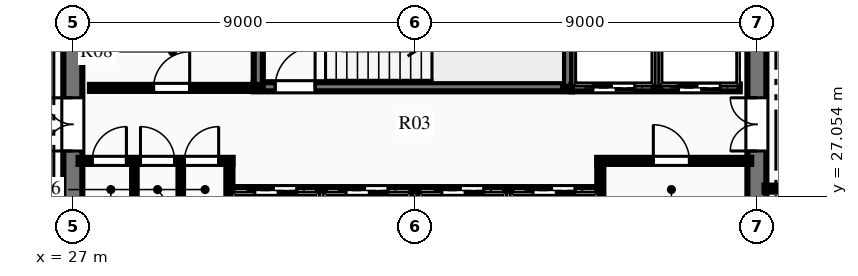
"""IFC4 building model, lengths in metres.
Left out: names, types, materials, properties, quantities, classifications, styles, units other than length and angle.
Written with IfcOpenShell. Run it as: python <this file> out.ifc"""

import sys

from ifc_helpers import new_model, si_unit, direction, frame, frame_2d, origin, place, context, subcontext, project, spatial, rectangle, extrude, element, fill, save


model = new_model("IFC4")
c1 = context("Model", 3, precision=1e-05, world=origin(), true_north=direction((0.0, 1.0)))
c2 = subcontext(c1, "Body", "Model", "MODEL_VIEW")
j1 = project(units=[si_unit("LENGTHUNIT", "METRE"), si_unit("PLANEANGLEUNIT", "RADIAN")], contexts=[c1])
p1 = place(None, origin())
s1 = spatial("IfcSite", under=j1, at=p1, CompositionType="ELEMENT")
p2 = place(p1, origin())
s2 = spatial("IfcBuilding", under=s1, at=p2, CompositionType="ELEMENT")
p3 = place(p2, frame((0.0, 0.0, 213.45)))
s3 = spatial("IfcBuildingStorey", under=s2, at=p3, CompositionType="ELEMENT", Elevation=213.45)
p4 = place(p3, frame((27.0, 18.25, 0.0), z_axis=(0.0, 0.0, 1.0), x_axis=(0.0, 1.0, 0.0)))
e1 = element("IfcWall", 1, at=p4, inside=s3, PredefinedType="SHEAR", context=c2, shape_type="SweptSolid", body=[
    extrude(rectangle(XDim=15.5, YDim=0.5, at=frame_2d((7.75, 0.0))), origin(), (0.0, 0.0, 1.0), 3.75),
])
p5 = place(p4, frame((9.99, 0.0, 0.0)))
e2 = element("IfcOpeningElement", 2, at=p5, cuts=e1, PredefinedType="OPENING", context=c2, shape_type="SweptSolid", body=[
    extrude(rectangle(XDim=1.4, YDim=2.2, at=frame_2d((0.7, 1.1))), frame((0.0, 0.26, 0.0), z_axis=(0.0, -1.0, 0.0), x_axis=(1.0, 0.0, 0.0)), (0.0, 0.0, 1.0), 0.52),
])
p6 = place(p3, frame((45.0, 18.25, 0.0), z_axis=(0.0, 0.0, 1.0), x_axis=(0.0, 1.0, 0.0)))
e3 = element("IfcWall", 3, at=p6, inside=s3, PredefinedType="SHEAR", context=c2, shape_type="SweptSolid", body=[
    extrude(rectangle(XDim=15.5, YDim=0.5, at=frame_2d((7.75, 0.0))), origin(), (0.0, 0.0, 1.0), 3.75),
])
p7 = place(p6, frame((9.99, 0.0, 0.0)))
e4 = element("IfcOpeningElement", 4, at=p7, cuts=e3, PredefinedType="OPENING", context=c2, shape_type="SweptSolid", body=[
    extrude(rectangle(XDim=1.4, YDim=2.2, at=frame_2d((0.7, 1.1))), frame((0.0, 0.26, 0.0), z_axis=(0.0, -1.0, 0.0), x_axis=(1.0, 0.0, 0.0)), (0.0, 0.0, 1.0), 0.52),
])
p8 = place(p3, frame((31.76, 29.93, 0.0), z_axis=(0.0, 0.0, 1.0), x_axis=(1.0, 0.0, 0.0)))
e5 = element("IfcWall", 5, at=p8, inside=s3, PredefinedType="SHEAR", context=c2, shape_type="SweptSolid", body=[
    extrude(rectangle(XDim=8.38, YDim=0.24, at=frame_2d((4.19, 0.0))), origin(), (0.0, 0.0, 1.0), 3.75),
])
p9 = place(p8, frame((0.565, 0.0, 0.0)))
e6 = element("IfcOpeningElement", 6, at=p9, cuts=e5, PredefinedType="OPENING", context=c2, shape_type="SweptSolid", body=[
    extrude(rectangle(XDim=1.05, YDim=2.15, at=frame_2d((0.525, 1.075))), frame((0.0, 0.13, 0.0), z_axis=(0.0, -1.0, 0.0), x_axis=(1.0, 0.0, 0.0)), (0.0, 0.0, 1.0), 0.26),
])
p10 = place(p3, frame((31.88, 29.93, 0.0), z_axis=(0.0, 0.0, 1.0), x_axis=(0.0, 1.0, 0.0)))
e7 = element("IfcWall", 7, at=p10, inside=s3, PredefinedType="SHEAR", context=c2, shape_type="SweptSolid", body=[
    extrude(rectangle(XDim=3.79, YDim=0.24, at=frame_2d((1.895, 0.0))), origin(), (0.0, 0.0, 1.0), 3.75),
])
p11 = place(p3, frame((40.02, 29.93, 0.0), z_axis=(0.0, 0.0, 1.0), x_axis=(0.0, 1.0, 0.0)))
e8 = element("IfcWall", 8, at=p11, inside=s3, PredefinedType="SHEAR", context=c2, shape_type="SweptSolid", body=[
    extrude(rectangle(XDim=3.85, YDim=0.24, at=frame_2d((1.925, 0.0))), origin(), (0.0, 0.0, 1.0), 3.75),
])
p12 = place(p3, frame((27.15, 27.98, 0.0), z_axis=(0.0, 0.0, 1.0), x_axis=(1.0, 0.0, 0.0)))
e9 = element("IfcWall", 9, at=p12, inside=s3, PredefinedType="PARTITIONING", context=c2, shape_type="SweptSolid", body=[
    extrude(rectangle(XDim=4.05, YDim=0.16, at=frame_2d((2.025, 0.0))), origin(), (0.0, 0.0, 1.0), 3.47),
])
p13 = place(p12, frame((0.36, 0.0, 0.0)))
e10 = element("IfcOpeningElement", 10, at=p13, cuts=e9, PredefinedType="OPENING", context=c2, shape_type="SweptSolid", body=[
    extrude(rectangle(XDim=0.9, YDim=2.15, at=frame_2d((0.45, 1.075))), frame((0.0, 0.09, 0.0), z_axis=(0.0, -1.0, 0.0), x_axis=(1.0, 0.0, 0.0)), (0.0, 0.0, 1.0), 0.18),
])
p14 = place(p12, frame((1.63, 0.0, 0.0)))
e11 = element("IfcOpeningElement", 11, at=p14, cuts=e9, PredefinedType="OPENING", context=c2, shape_type="SweptSolid", body=[
    extrude(rectangle(XDim=0.9, YDim=2.15, at=frame_2d((0.45, 1.075))), frame((0.0, 0.09, 0.0), z_axis=(0.0, -1.0, 0.0), x_axis=(1.0, 0.0, 0.0)), (0.0, 0.0, 1.0), 0.18),
])
p15 = place(p12, frame((2.788, 0.0, 0.0)))
e12 = element("IfcOpeningElement", 12, at=p15, cuts=e9, PredefinedType="OPENING", context=c2, shape_type="SweptSolid", body=[
    extrude(rectangle(XDim=0.9, YDim=2.15, at=frame_2d((0.45, 1.075))), frame((0.0, 0.09, 0.0), z_axis=(0.0, -1.0, 0.0), x_axis=(1.0, 0.0, 0.0)), (0.0, 0.0, 1.0), 0.18),
])
p16 = place(p3, frame((31.12, 26.54, 0.0), z_axis=(0.0, 0.0, 1.0), x_axis=(0.0, 1.0, 0.0)))
e13 = element("IfcWall", 13, at=p16, inside=s3, PredefinedType="PARTITIONING", context=c2, shape_type="SweptSolid", body=[
    extrude(rectangle(XDim=1.51, YDim=0.16, at=frame_2d((0.755, 0.0))), origin(), (0.0, 0.0, 1.0), 3.47),
])
p17 = place(p3, frame((40.8, 27.98, 0.0), z_axis=(0.0, 0.0, 1.0), x_axis=(1.0, 0.0, 0.0)))
e14 = element("IfcWall", 14, at=p17, inside=s3, PredefinedType="PARTITIONING", context=c2, shape_type="SweptSolid", body=[
    extrude(rectangle(XDim=4.05, YDim=0.16, at=frame_2d((2.025, 0.0))), origin(), (0.0, 0.0, 1.0), 3.47),
])
p18 = place(p17, frame((1.475, 0.0, 0.0)))
e15 = element("IfcOpeningElement", 15, at=p18, cuts=e14, PredefinedType="OPENING", context=c2, shape_type="SweptSolid", body=[
    extrude(rectangle(XDim=0.95, YDim=2.15, at=frame_2d((0.475, 1.075))), frame((0.0, 0.09, 0.0), z_axis=(0.0, -1.0, 0.0), x_axis=(1.0, 0.0, 0.0)), (0.0, 0.0, 1.0), 0.18),
])
p19 = place(p3, frame((40.88, 26.54, 0.0), z_axis=(0.0, 0.0, 1.0), x_axis=(0.0, 1.0, 0.0)))
e16 = element("IfcWall", 16, at=p19, inside=s3, PredefinedType="PARTITIONING", context=c2, shape_type="SweptSolid", body=[
    extrude(rectangle(XDim=1.51, YDim=0.16, at=frame_2d((0.755, 0.0))), origin(), (0.0, 0.0, 1.0), 3.47),
])
for number, where, z_axis, x_axis in (
    (17, (28.62, 26.54, 0.0), (0.0, 0.0, 1.0), (0.0, 1.0, 0.0)),
    (18, (29.84, 26.54, 0.0), (0.0, 0.0, 1.0), (0.0, 1.0, 0.0)),
):
    element("IfcWall", number, at=place(p3, frame(where, z_axis=z_axis, x_axis=x_axis)), inside=s3, PredefinedType="PARTITIONING", context=c2, shape_type="SweptSolid", body=[
        extrude(rectangle(XDim=1.44, YDim=0.12, at=frame_2d((0.72, 0.0))), origin(), (0.0, 0.0, 1.0), 3.47),
    ])
p20 = place(p3, frame((27.45, 29.9, 0.0), z_axis=(0.0, 0.0, 1.0), x_axis=(1.0, 0.0, 0.0)))
e19 = element("IfcWall", 19, at=p20, inside=s3, PredefinedType="PARTITIONING", context=c2, shape_type="SweptSolid", body=[
    extrude(rectangle(XDim=4.43, YDim=0.16, at=frame_2d((2.215, 0.0))), origin(), (0.0, 0.0, 1.0), 3.47),
])
p21 = place(p20, frame((1.675, 0.0, 0.0)))
e20 = element("IfcOpeningElement", 20, at=p21, cuts=e19, PredefinedType="OPENING", context=c2, shape_type="SweptSolid", body=[
    extrude(rectangle(XDim=0.95, YDim=2.15, at=frame_2d((0.475, 1.075))), frame((0.0, 0.09, 0.0), z_axis=(0.0, -1.0, 0.0), x_axis=(1.0, 0.0, 0.0)), (0.0, 0.0, 1.0), 0.18),
])
p22 = place(p3, frame((40.12, 29.9, 0.0), z_axis=(0.0, 0.0, 1.0), x_axis=(1.0, 0.0, 0.0)))
e21 = element("IfcWall", 21, at=p22, inside=s3, PredefinedType="PARTITIONING", context=c2, shape_type="SweptSolid", body=[
    extrude(rectangle(XDim=4.43, YDim=0.18, at=frame_2d((2.215, 0.0))), origin(), (0.0, 0.0, 1.0), 3.47),
])
p23 = place(p22, frame((0.565, 0.0, 0.0)))
e22 = element("IfcOpeningElement", 22, at=p23, cuts=e21, PredefinedType="OPENING", context=c2, shape_type="SweptSolid", body=[
    extrude(rectangle(XDim=1.1, YDim=2.15, at=frame_2d((0.55, 1.075))), frame((0.0, 0.1, 0.0), z_axis=(0.0, -1.0, 0.0), x_axis=(1.0, 0.0, 0.0)), (0.0, 0.0, 1.0), 0.2),
])
p24 = place(p22, frame((2.815, 0.0, 0.0)))
e23 = element("IfcOpeningElement", 23, at=p24, cuts=e21, PredefinedType="OPENING", context=c2, shape_type="SweptSolid", body=[
    extrude(rectangle(XDim=1.1, YDim=2.15, at=frame_2d((0.55, 1.075))), frame((0.0, 0.1, 0.0), z_axis=(0.0, -1.0, 0.0), x_axis=(1.0, 0.0, 0.0)), (0.0, 0.0, 1.0), 0.2),
])
p25 = place(p3, frame((42.37, 29.9, 0.0), z_axis=(0.0, 0.0, 1.0), x_axis=(0.0, 1.0, 0.0)))
e24 = element("IfcWall", 24, at=p25, inside=s3, PredefinedType="PARTITIONING", context=c2, shape_type="SweptSolid", body=[
    extrude(rectangle(XDim=3.75, YDim=0.18, at=frame_2d((1.875, 0.0))), origin(), (0.0, 0.0, 1.0), 3.47),
])
p26 = place(p3, frame((31.2, 27.2, 0.0), z_axis=(0.0, 0.0, 1.0), x_axis=(1.0, 0.0, 0.0)))
e25 = element("IfcWall", 25, at=p26, inside=s3, PredefinedType="PARTITIONING", context=c2, shape_type="SweptSolid", body=[
    extrude(rectangle(XDim=9.6, YDim=0.18, at=frame_2d((4.8, 0.0))), origin(), (0.0, 0.0, 1.0), 3.47),
])
p27 = place(p26, frame((0.59, 0.0, 0.0)))
e26 = element("IfcOpeningElement", 26, at=p27, cuts=e25, PredefinedType="OPENING", context=c2, shape_type="SweptSolid", body=[
    extrude(rectangle(XDim=1.1, YDim=2.15, at=frame_2d((0.55, 1.075))), frame((0.0, 0.1, 0.0), z_axis=(0.0, -1.0, 0.0), x_axis=(1.0, 0.0, 0.0)), (0.0, 0.0, 1.0), 0.2),
])
p28 = place(p26, frame((2.99, 0.0, 0.0)))
e27 = element("IfcOpeningElement", 27, at=p28, cuts=e25, PredefinedType="OPENING", context=c2, shape_type="SweptSolid", body=[
    extrude(rectangle(XDim=1.1, YDim=2.15, at=frame_2d((0.55, 1.075))), frame((0.0, 0.1, 0.0), z_axis=(0.0, -1.0, 0.0), x_axis=(1.0, 0.0, 0.0)), (0.0, 0.0, 1.0), 0.2),
])
p29 = place(p26, frame((5.51, 0.0, 0.0)))
e28 = element("IfcOpeningElement", 28, at=p29, cuts=e25, PredefinedType="OPENING", context=c2, shape_type="SweptSolid", body=[
    extrude(rectangle(XDim=1.1, YDim=2.15, at=frame_2d((0.55, 1.075))), frame((0.0, 0.1, 0.0), z_axis=(0.0, -1.0, 0.0), x_axis=(1.0, 0.0, 0.0)), (0.0, 0.0, 1.0), 0.2),
])
p30 = place(p26, frame((7.91, 0.0, 0.0)))
e29 = element("IfcOpeningElement", 29, at=p30, cuts=e25, PredefinedType="OPENING", context=c2, shape_type="SweptSolid", body=[
    extrude(rectangle(XDim=1.1, YDim=2.15, at=frame_2d((0.55, 1.075))), frame((0.0, 0.1, 0.0), z_axis=(0.0, -1.0, 0.0), x_axis=(1.0, 0.0, 0.0)), (0.0, 0.0, 1.0), 0.2),
])
for number, where, z_axis, x_axis in (
    (30, (33.54, 25.3, 0.0), (0.0, 0.0, 1.0), (0.0, 1.0, 0.0)),
    (31, (36.0, 25.3, 0.0), (0.0, 0.0, 1.0), (0.0, 1.0, 0.0)),
    (32, (38.46, 25.3, 0.0), (0.0, 0.0, 1.0), (0.0, 1.0, 0.0)),
):
    element("IfcWall", number, at=place(p3, frame(where, z_axis=z_axis, x_axis=x_axis)), inside=s3, PredefinedType="PARTITIONING", context=c2, shape_type="SweptSolid", body=[
        extrude(rectangle(XDim=1.9, YDim=0.18, at=frame_2d((0.95, 0.0))), origin(), (0.0, 0.0, 1.0), 3.47),
    ])
p31 = place(p3, frame((45.2, 27.25, 0.0), z_axis=(0.0, 0.0, 1.0), x_axis=(1.0, 0.0, 0.0)))
e33 = element("IfcWall", 33, at=p31, inside=s3, PredefinedType="PARTITIONING", context=c2, shape_type="SweptSolid", body=[
    extrude(rectangle(XDim=2.25, YDim=0.16, at=frame_2d((1.125, 0.0))), origin(), (0.0, 0.0, 1.0), 3.47),
])
p32 = place(p13, origin())
e34 = element("IfcDoor", 34, at=p32, inside=s3, OperationType="SINGLE_SWING_RIGHT", PredefinedType="DOOR", context=c2, shape_type="SweptSolid", body=[
    extrude(rectangle(XDim=0.9, YDim=2.15, at=frame_2d((0.45, 1.075))), frame((0.0, 0.025, 0.0), z_axis=(0.0, -1.0, 0.0), x_axis=(1.0, 0.0, 0.0)), (0.0, 0.0, 1.0), 0.05),
])
fill(e10, e34)
p33 = place(p14, origin())
e35 = element("IfcDoor", 35, at=p33, inside=s3, OperationType="SINGLE_SWING_LEFT", PredefinedType="DOOR", context=c2, shape_type="SweptSolid", body=[
    extrude(rectangle(XDim=0.9, YDim=2.15, at=frame_2d((0.45, 1.075))), frame((0.0, 0.025, 0.0), z_axis=(0.0, -1.0, 0.0), x_axis=(1.0, 0.0, 0.0)), (0.0, 0.0, 1.0), 0.05),
])
fill(e11, e35)
p34 = place(p15, origin())
e36 = element("IfcDoor", 36, at=p34, inside=s3, OperationType="SINGLE_SWING_RIGHT", PredefinedType="DOOR", context=c2, shape_type="SweptSolid", body=[
    extrude(rectangle(XDim=0.9, YDim=2.15, at=frame_2d((0.45, 1.075))), frame((0.0, 0.025, 0.0), z_axis=(0.0, -1.0, 0.0), x_axis=(1.0, 0.0, 0.0)), (0.0, 0.0, 1.0), 0.05),
])
fill(e12, e36)
p35 = place(p18, origin())
e37 = element("IfcDoor", 37, at=p35, inside=s3, OperationType="SINGLE_SWING_LEFT", PredefinedType="DOOR", context=c2, shape_type="SweptSolid", body=[
    extrude(rectangle(XDim=0.95, YDim=2.15, at=frame_2d((0.475, 1.075))), frame((0.0, 0.025, 0.0), z_axis=(0.0, -1.0, 0.0), x_axis=(1.0, 0.0, 0.0)), (0.0, 0.0, 1.0), 0.05),
])
fill(e15, e37)
p36 = place(p21, origin())
e38 = element("IfcDoor", 38, at=p36, inside=s3, OperationType="SINGLE_SWING_RIGHT", PredefinedType="DOOR", context=c2, shape_type="SweptSolid", body=[
    extrude(rectangle(XDim=0.95, YDim=2.15, at=frame_2d((0.475, 1.075))), frame((0.0, 0.025, 0.0), z_axis=(0.0, -1.0, 0.0), x_axis=(1.0, 0.0, 0.0)), (0.0, 0.0, 1.0), 0.05),
])
fill(e20, e38)
p37 = place(p9, origin())
e39 = element("IfcDoor", 39, at=p37, inside=s3, OperationType="SINGLE_SWING_RIGHT", PredefinedType="DOOR", context=c2, shape_type="SweptSolid", body=[
    extrude(rectangle(XDim=1.05, YDim=2.15, at=frame_2d((0.525, 1.075))), frame((0.0, 0.025, 0.0), z_axis=(0.0, -1.0, 0.0), x_axis=(1.0, 0.0, 0.0)), (0.0, 0.0, 1.0), 0.05),
])
fill(e6, e39)
p38 = place(p5, origin())
e40 = element("IfcDoor", 40, at=p38, inside=s3, OperationType="DOUBLE_DOOR_SINGLE_SWING", PredefinedType="DOOR", context=c2, shape_type="SweptSolid", body=[
    extrude(rectangle(XDim=1.4, YDim=2.2, at=frame_2d((0.7, 1.1))), frame((0.0, 0.025, 0.0), z_axis=(0.0, -1.0, 0.0), x_axis=(1.0, 0.0, 0.0)), (0.0, 0.0, 1.0), 0.05),
])
fill(e2, e40)
p39 = place(p7, origin())
e41 = element("IfcDoor", 41, at=p39, inside=s3, OperationType="DOUBLE_DOOR_SINGLE_SWING", PredefinedType="DOOR", context=c2, shape_type="SweptSolid", body=[
    extrude(rectangle(XDim=1.4, YDim=2.2, at=frame_2d((0.7, 1.1))), frame((0.0, 0.025, 0.0), z_axis=(0.0, -1.0, 0.0), x_axis=(1.0, 0.0, 0.0)), (0.0, 0.0, 1.0), 0.05),
])
fill(e4, e41)
p40 = place(p23, origin())
e42 = element("IfcDoor", 42, at=p40, inside=s3, OperationType="SLIDING_TO_LEFT", PredefinedType="DOOR", context=c2, shape_type="SweptSolid", body=[
    extrude(rectangle(XDim=1.1, YDim=2.15, at=frame_2d((0.55, 1.075))), frame((0.0, 0.025, 0.0), z_axis=(0.0, -1.0, 0.0), x_axis=(1.0, 0.0, 0.0)), (0.0, 0.0, 1.0), 0.05),
])
fill(e22, e42)
p41 = place(p24, origin())
e43 = element("IfcDoor", 43, at=p41, inside=s3, OperationType="SLIDING_TO_LEFT", PredefinedType="DOOR", context=c2, shape_type="SweptSolid", body=[
    extrude(rectangle(XDim=1.1, YDim=2.15, at=frame_2d((0.55, 1.075))), frame((0.0, 0.025, 0.0), z_axis=(0.0, -1.0, 0.0), x_axis=(1.0, 0.0, 0.0)), (0.0, 0.0, 1.0), 0.05),
])
fill(e23, e43)
p42 = place(p27, origin())
e44 = element("IfcDoor", 44, at=p42, inside=s3, OperationType="SLIDING_TO_LEFT", PredefinedType="DOOR", context=c2, shape_type="SweptSolid", body=[
    extrude(rectangle(XDim=1.1, YDim=2.15, at=frame_2d((0.55, 1.075))), frame((0.0, 0.025, 0.0), z_axis=(0.0, -1.0, 0.0), x_axis=(1.0, 0.0, 0.0)), (0.0, 0.0, 1.0), 0.05),
])
fill(e26, e44)
p43 = place(p28, origin())
e45 = element("IfcDoor", 45, at=p43, inside=s3, OperationType="SLIDING_TO_LEFT", PredefinedType="DOOR", context=c2, shape_type="SweptSolid", body=[
    extrude(rectangle(XDim=1.1, YDim=2.15, at=frame_2d((0.55, 1.075))), frame((0.0, 0.025, 0.0), z_axis=(0.0, -1.0, 0.0), x_axis=(1.0, 0.0, 0.0)), (0.0, 0.0, 1.0), 0.05),
])
fill(e27, e45)
p44 = place(p29, origin())
e46 = element("IfcDoor", 46, at=p44, inside=s3, OperationType="SLIDING_TO_LEFT", PredefinedType="DOOR", context=c2, shape_type="SweptSolid", body=[
    extrude(rectangle(XDim=1.1, YDim=2.15, at=frame_2d((0.55, 1.075))), frame((0.0, 0.025, 0.0), z_axis=(0.0, -1.0, 0.0), x_axis=(1.0, 0.0, 0.0)), (0.0, 0.0, 1.0), 0.05),
])
fill(e28, e46)
p45 = place(p30, origin())
e47 = element("IfcDoor", 47, at=p45, inside=s3, OperationType="SLIDING_TO_LEFT", PredefinedType="DOOR", context=c2, shape_type="SweptSolid", body=[
    extrude(rectangle(XDim=1.1, YDim=2.15, at=frame_2d((0.55, 1.075))), frame((0.0, 0.025, 0.0), z_axis=(0.0, -1.0, 0.0), x_axis=(1.0, 0.0, 0.0)), (0.0, 0.0, 1.0), 0.05),
])
fill(e29, e47)
save(model, sys.argv[1])
